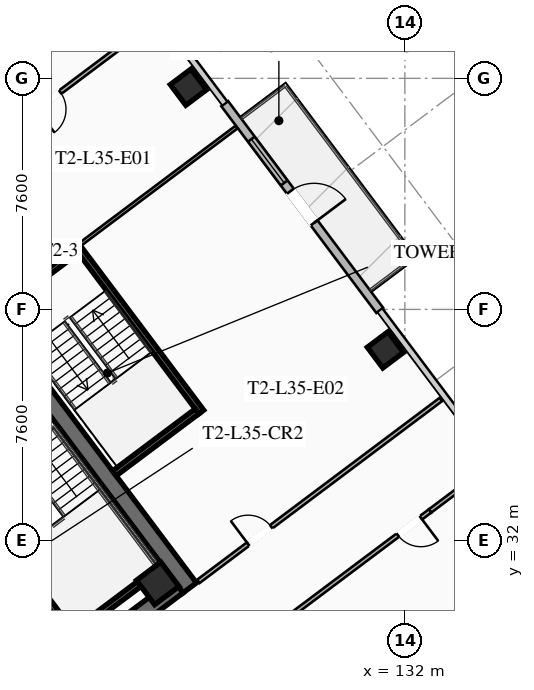
"""IFC4 building model, lengths in metres.
Left out: names, types, materials, properties, quantities, classifications, styles, units other than length and angle.
Written with IfcOpenShell. Run it as: python <this file> out.ifc"""

import sys

from ifc_helpers import new_model, si_unit, direction, frame, frame_2d, origin, origin_2d, place, context, subcontext, project, spatial, rectangle, hollow_rectangle, extrude, element, fill, save


model = new_model("IFC4")
c1 = context("Model", 3, precision=1e-05, world=origin(), true_north=direction((0.0, 1.0)))
c2 = subcontext(c1, "Body", "Model", "MODEL_VIEW")
j1 = project(units=[si_unit("LENGTHUNIT", "METRE"), si_unit("PLANEANGLEUNIT", "RADIAN")], contexts=[c1])
p1 = place(None, origin())
s1 = spatial("IfcSite", under=j1, at=p1, CompositionType="ELEMENT")
p2 = place(p1, origin())
s2 = spatial("IfcBuilding", under=s1, at=p2, CompositionType="ELEMENT")
p3 = place(p2, frame((0.0, 0.0, 132.15)))
s3 = spatial("IfcBuildingStorey", under=s2, at=p3, CompositionType="ELEMENT", Elevation=132.15)
p4 = place(p3, frame((115.564, 42.923, 0.0), z_axis=(0.0, 0.0, 1.0), x_axis=(0.600005007985, -0.799996243986, 0.0)))
e1 = element("IfcWall", 1, at=p4, inside=s3, PredefinedType="SHEAR", context=c2, shape_type="SweptSolid", body=[
    extrude(rectangle(XDim=15.6, YDim=0.55, at=frame_2d((7.8, 0.0))), origin(), (0.0, 0.0, 1.0), 3.55),
])
p5 = place(p3, frame((124.539, 30.498, 0.0), z_axis=(0.0, 0.0, 1.0), x_axis=(-0.799998054672, -0.600002593761, 0.0)))
e2 = element("IfcWall", 2, at=p5, inside=s3, PredefinedType="SHEAR", context=c2, shape_type="SweptSolid", body=[
    extrude(rectangle(XDim=15.06, YDim=0.55, at=frame_2d((7.53, 0.0))), origin(), (0.0, 0.0, 1.0), 3.55),
])
p6 = place(p5, frame((9.23, 0.0, 0.0)))
e3 = element("IfcOpeningElement", 3, at=p6, cuts=e2, PredefinedType="OPENING", context=c2, shape_type="SweptSolid", body=[
    extrude(rectangle(XDim=1.25, YDim=2.25, at=frame_2d((0.625, 1.125))), frame((0.0, 0.285, 0.0), z_axis=(0.0, -1.0, 0.0), x_axis=(1.0, 0.0, 0.0)), (0.0, 0.0, 1.0), 0.57),
])
p7 = place(p5, frame((4.18, 0.0, 0.0)))
e4 = element("IfcOpeningElement", 4, at=p7, cuts=e2, PredefinedType="OPENING", context=c2, shape_type="SweptSolid", body=[
    extrude(rectangle(XDim=1.25, YDim=2.25, at=frame_2d((0.625, 1.125))), frame((0.0, 0.285, 0.0), z_axis=(0.0, -1.0, 0.0), x_axis=(1.0, 0.0, 0.0)), (0.0, 0.0, 1.0), 0.57),
])
p8 = place(p3, frame((123.87, 30.59, 0.0), z_axis=(0.0, 0.0, 1.0), x_axis=(0.799999996291, 0.600000004945, 0.0)))
e5 = element("IfcColumn", 5, at=p8, inside=s3, PredefinedType="COLUMN", context=c2, shape_type="SweptSolid", body=[
    extrude(hollow_rectangle(XDim=1.0, YDim=1.0, WallThickness=0.04, at=origin_2d()), origin(), (0.0, 0.0, 1.0), 3.37),
])
for number, where, z_axis, x_axis in (
    (6, (131.36, 38.27, 0.0), (0.0, 0.0, 1.0), (0.8, 0.6, 0.0)),
    (7, (124.88, 46.91, 0.0), (0.0, 0.0, 1.0), (0.8, 0.6, 0.0)),
):
    element("IfcColumn", number, at=place(p3, frame(where, z_axis=z_axis, x_axis=x_axis)), inside=s3, PredefinedType="COLUMN", context=c2, shape_type="SweptSolid", body=[
        extrude(hollow_rectangle(XDim=0.85, YDim=0.85, WallThickness=0.035, at=origin_2d()), origin(), (0.0, 0.0, 1.0), 3.37),
    ])
p9 = place(p3, frame((126.074, 46.368, 0.0), z_axis=(0.0, 0.0, 1.0), x_axis=(0.600018382406, -0.799986212866, 0.0)))
e8 = element("IfcWall", 8, at=p9, inside=s3, PredefinedType="SOLIDWALL", context=c2, shape_type="SweptSolid", body=[
    extrude(rectangle(XDim=8.5, YDim=0.28, at=frame_2d((4.25, 0.0))), origin(), (0.0, 0.0, 1.0), 3.37),
])
p10 = place(p9, frame((3.6, 0.0, 0.0)))
e9 = element("IfcOpeningElement", 9, at=p10, cuts=e8, PredefinedType="OPENING", context=c2, shape_type="SweptSolid", body=[
    extrude(rectangle(XDim=1.3, YDim=2.15, at=frame_2d((0.65, 1.075))), frame((0.0, 0.15, 0.0), z_axis=(0.0, -1.0, 0.0), x_axis=(1.0, 0.0, 0.0)), (0.0, 0.0, 1.0), 0.3),
])
p11 = place(p9, frame((1.46, 0.0, 0.85)))
e10 = element("IfcOpeningElement", 10, at=p11, cuts=e8, PredefinedType="OPENING", context=c2, shape_type="SweptSolid", body=[
    extrude(rectangle(XDim=1.8, YDim=1.92, at=frame_2d((0.9, 0.96))), frame((0.0, 0.15, 0.0), z_axis=(0.0, -1.0, 0.0), x_axis=(1.0, 0.0, 0.0)), (0.0, 0.0, 1.0), 0.3),
])
p12 = place(p3, frame((116.56, 34.92, 0.0), z_axis=(0.0, 0.0, 1.0), x_axis=(0.59999029481, -0.8000072788, 0.0)))
e11 = element("IfcWall", 11, at=p12, inside=s3, PredefinedType="SHEAR", context=c2, shape_type="SweptSolid", body=[
    extrude(rectangle(XDim=8.05, YDim=0.2, at=frame_2d((4.025, 0.0))), origin(), (0.0, 0.0, 1.0), 3.37),
])
p13 = place(p12, frame((0.45, 0.0, 0.0)))
e12 = element("IfcOpeningElement", 12, at=p13, cuts=e11, PredefinedType="OPENING", context=c2, shape_type="SweptSolid", body=[
    extrude(rectangle(XDim=1.15, YDim=2.2, at=frame_2d((0.575, 1.1))), frame((0.0, 0.11, 0.0), z_axis=(0.0, -1.0, 0.0), x_axis=(1.0, 0.0, 0.0)), (0.0, 0.0, 1.0), 0.22),
])
p14 = place(p3, frame((120.98, 28.86, 0.0), z_axis=(0.0, 0.0, 1.0), x_axis=(0.800015298837, 0.599979601008, 0.0)))
e13 = element("IfcWall", 13, at=p14, inside=s3, PredefinedType="SHEAR", context=c2, shape_type="SweptSolid", body=[
    extrude(rectangle(XDim=3.83, YDim=0.2, at=frame_2d((1.915, 0.0))), origin(), (0.0, 0.0, 1.0), 3.37),
])
p15 = place(p3, frame((125.304, 36.228, 0.0), z_axis=(0.0, 0.0, 1.0), x_axis=(-0.59998851072, 0.800008616831, 0.0)))
e14 = element("IfcWall", 14, at=p15, inside=s3, PredefinedType="SHEAR", context=c2, shape_type="SweptSolid", body=[
    extrude(rectangle(XDim=6.8, YDim=0.2, at=frame_2d((3.4, 0.0))), origin(), (0.0, 0.0, 1.0), 3.37),
])
p16 = place(p3, frame((121.204, 41.528, 0.0), z_axis=(0.0, 0.0, 1.0), x_axis=(-0.800017232136, -0.599977023131, 0.0)))
e15 = element("IfcWall", 15, at=p16, inside=s3, PredefinedType="SHEAR", context=c2, shape_type="SweptSolid", body=[
    extrude(rectangle(XDim=3.4, YDim=0.2, at=frame_2d((1.7, 0.0))), origin(), (0.0, 0.0, 1.0), 3.37),
])
p17 = place(p16, frame((1.975, 0.0, 0.0)))
e16 = element("IfcOpeningElement", 16, at=p17, cuts=e15, PredefinedType="OPENING", context=c2, shape_type="SweptSolid", body=[
    extrude(rectangle(XDim=1.15, YDim=2.2, at=frame_2d((0.575, 1.1))), frame((0.0, 0.11, 0.0), z_axis=(0.0, -1.0, 0.0), x_axis=(1.0, 0.0, 0.0)), (0.0, 0.0, 1.0), 0.22),
])
p18 = place(p3, frame((122.444, 34.208, 0.0), z_axis=(0.0, 0.0, 1.0), x_axis=(0.79999138319, 0.600011488909, 0.0)))
e17 = element("IfcWall", 17, at=p18, inside=s3, PredefinedType="SHEAR", context=c2, shape_type="SweptSolid", body=[
    extrude(rectangle(XDim=3.4, YDim=0.2, at=frame_2d((1.7, 0.0))), origin(), (0.0, 0.0, 1.0), 3.37),
])
p19 = place(p3, frame((95.87, 30.09, 0.0), z_axis=(0.0, 0.0, 1.0), x_axis=(0.799997191971, 0.600003744021, 0.0)))
e18 = element("IfcWall", 18, at=p19, inside=s3, PredefinedType="PARTITIONING", context=c2, shape_type="SweptSolid", body=[
    extrude(rectangle(XDim=31.3, YDim=0.135, at=frame_2d((15.65, 0.0))), origin(), (0.0, 0.0, 1.0), 2.723),
])
p20 = place(p19, frame((0.3, 0.0, 0.0)))
e19 = element("IfcOpeningElement", 19, at=p20, cuts=e18, PredefinedType="OPENING", context=c2, shape_type="SweptSolid", body=[
    extrude(rectangle(XDim=0.95, YDim=2.05, at=frame_2d((0.475, 1.025))), frame((0.0, 0.077, 0.0), z_axis=(0.0, -1.0, 0.0), x_axis=(1.0, 0.0, 0.0)), (0.0, 0.0, 1.0), 0.155),
])
p21 = place(p19, frame((11.202, 0.0, 0.0)))
e20 = element("IfcOpeningElement", 20, at=p21, cuts=e18, PredefinedType="OPENING", context=c2, shape_type="SweptSolid", body=[
    extrude(rectangle(XDim=0.95, YDim=2.05, at=frame_2d((0.475, 1.025))), frame((0.0, 0.077, 0.0), z_axis=(0.0, -1.0, 0.0), x_axis=(1.0, 0.0, 0.0)), (0.0, 0.0, 1.0), 0.155),
])
p22 = place(p19, frame((15.474, 0.0, 0.0)))
e21 = element("IfcOpeningElement", 21, at=p22, cuts=e18, PredefinedType="OPENING", context=c2, shape_type="SweptSolid", body=[
    extrude(rectangle(XDim=0.95, YDim=2.05, at=frame_2d((0.475, 1.025))), frame((0.0, 0.077, 0.0), z_axis=(0.0, -1.0, 0.0), x_axis=(1.0, 0.0, 0.0)), (0.0, 0.0, 1.0), 0.155),
])
p23 = place(p19, frame((30.05, 0.0, 0.0)))
e22 = element("IfcOpeningElement", 22, at=p23, cuts=e18, PredefinedType="OPENING", context=c2, shape_type="SweptSolid", body=[
    extrude(rectangle(XDim=0.95, YDim=2.05, at=frame_2d((0.475, 1.025))), frame((0.0, 0.077, 0.0), z_axis=(0.0, -1.0, 0.0), x_axis=(1.0, 0.0, 0.0)), (0.0, 0.0, 1.0), 0.155),
])
p24 = place(p3, frame((132.832, 32.974, 0.0), z_axis=(0.0, 0.0, 1.0), x_axis=(-0.8, -0.6, 0.0)))
e23 = element("IfcWall", 23, at=p24, inside=s3, PredefinedType="PARTITIONING", context=c2, shape_type="SweptSolid", body=[
    extrude(rectangle(XDim=31.3, YDim=0.135, at=frame_2d((15.65, 0.0))), origin(), (0.0, 0.0, 1.0), 2.723),
])
p25 = place(p24, frame((29.97, 0.0, 0.0)))
e24 = element("IfcOpeningElement", 24, at=p25, cuts=e23, PredefinedType="OPENING", context=c2, shape_type="SweptSolid", body=[
    extrude(rectangle(XDim=0.95, YDim=2.05, at=frame_2d((0.475, 1.025))), frame((0.0, 0.077, 0.0), z_axis=(0.0, -1.0, 0.0), x_axis=(1.0, 0.0, 0.0)), (0.0, 0.0, 1.0), 0.155),
])
p26 = place(p24, frame((15.053, 0.0, 0.0)))
e25 = element("IfcOpeningElement", 25, at=p26, cuts=e23, PredefinedType="OPENING", context=c2, shape_type="SweptSolid", body=[
    extrude(rectangle(XDim=0.95, YDim=2.05, at=frame_2d((0.475, 1.025))), frame((0.0, 0.077, 0.0), z_axis=(0.0, -1.0, 0.0), x_axis=(1.0, 0.0, 0.0)), (0.0, 0.0, 1.0), 0.155),
])
p27 = place(p24, frame((0.38, 0.0, 0.0)))
e26 = element("IfcOpeningElement", 26, at=p27, cuts=e23, PredefinedType="OPENING", context=c2, shape_type="SweptSolid", body=[
    extrude(rectangle(XDim=0.95, YDim=2.05, at=frame_2d((0.475, 1.025))), frame((0.0, 0.077, 0.0), z_axis=(0.0, -1.0, 0.0), x_axis=(1.0, 0.0, 0.0)), (0.0, 0.0, 1.0), 0.155),
])
p28 = place(p3, frame((132.832, 32.974, 0.0), z_axis=(0.0, 0.0, 1.0), x_axis=(0.80002227902, 0.599970293491, 0.0)))
e27 = element("IfcWall", 27, at=p28, inside=s3, PredefinedType="PARTITIONING", context=c2, shape_type="SweptSolid", body=[
    extrude(rectangle(XDim=2.63, YDim=0.135, at=frame_2d((1.315, 0.0))), origin(), (0.0, 0.0, 1.0), 2.723),
])
p29 = place(p3, frame((123.824, 49.118, 0.0), z_axis=(0.0, 0.0, 1.0), x_axis=(-0.799996470201, -0.60000470637, 0.0)))
e28 = element("IfcWall", 28, at=p29, inside=s3, PredefinedType="PARTITIONING", context=c2, shape_type="SweptSolid", body=[
    extrude(rectangle(XDim=8.3, YDim=0.135, at=frame_2d((4.15, 0.0))), origin(), (0.0, 0.0, 1.0), 2.723),
])
p30 = place(p29, frame((3.95, 0.0, 0.0)))
e29 = element("IfcOpeningElement", 29, at=p30, cuts=e28, PredefinedType="OPENING", context=c2, shape_type="SweptSolid", body=[
    extrude(rectangle(XDim=0.95, YDim=2.05, at=frame_2d((0.475, 1.025))), frame((0.0, 0.077, 0.0), z_axis=(0.0, -1.0, 0.0), x_axis=(1.0, 0.0, 0.0)), (0.0, 0.0, 1.0), 0.155),
])
p31 = place(p3, frame((125.208, 30.656, 0.0), z_axis=(0.0, 0.0, 1.0), x_axis=(0.800005876956, 0.599992163979, 0.0)))
e30 = element("IfcWall", 30, at=p31, inside=s3, PredefinedType="PARTITIONING", context=c2, shape_type="SweptSolid", body=[
    extrude(rectangle(XDim=9.97, YDim=0.135, at=frame_2d((4.985, 0.0))), origin(), (0.0, 0.0, 1.0), 2.723),
])
p32 = place(p31, frame((2.045, 0.0, 0.0)))
e31 = element("IfcOpeningElement", 31, at=p32, cuts=e30, PredefinedType="OPENING", context=c2, shape_type="SweptSolid", body=[
    extrude(rectangle(XDim=0.95, YDim=2.05, at=frame_2d((0.475, 1.025))), frame((0.0, 0.077, 0.0), z_axis=(0.0, -1.0, 0.0), x_axis=(1.0, 0.0, 0.0)), (0.0, 0.0, 1.0), 0.155),
])
p33 = place(p3, frame((126.464, 45.598, 0.0), z_axis=(0.0, 0.0, 1.0), x_axis=(-0.8000181681, -0.599975775102, 0.0)))
e32 = element("IfcWall", 32, at=p33, inside=s3, PredefinedType="PARTITIONING", context=c2, shape_type="SweptSolid", body=[
    extrude(rectangle(XDim=6.45, YDim=0.11, at=frame_2d((3.225, 0.0))), origin(), (0.0, 0.0, 1.0), 2.723),
])
p34 = place(p10, origin())
e33 = element("IfcDoor", 33, at=p34, inside=s3, OperationType="SINGLE_SWING_RIGHT", PredefinedType="DOOR", context=c2, shape_type="SweptSolid", body=[
    extrude(rectangle(XDim=1.3, YDim=2.15, at=frame_2d((0.65, 1.075))), frame((0.0, 0.025, 0.0), z_axis=(0.0, -1.0, 0.0), x_axis=(1.0, 0.0, 0.0)), (0.0, 0.0, 1.0), 0.05),
])
fill(e9, e33)
p35 = place(p11, origin())
e34 = element("IfcWindow", 34, at=p35, inside=s3, PartitioningType="SINGLE_PANEL", PredefinedType="WINDOW", context=c2, shape_type="SweptSolid", body=[
    extrude(rectangle(XDim=1.8, YDim=1.92, at=frame_2d((0.9, 0.96))), frame((0.0, 0.03, 0.0), z_axis=(0.0, -1.0, 0.0), x_axis=(1.0, 0.0, 0.0)), (0.0, 0.0, 1.0), 0.06),
])
fill(e10, e34)
p36 = place(p27, origin())
e35 = element("IfcDoor", 35, at=p36, inside=s3, OperationType="SINGLE_SWING_LEFT", PredefinedType="DOOR", context=c2, shape_type="SweptSolid", body=[
    extrude(rectangle(XDim=0.95, YDim=2.05, at=frame_2d((0.475, 1.025))), frame((0.0, 0.025, 0.0), z_axis=(0.0, -1.0, 0.0), x_axis=(1.0, 0.0, 0.0)), (0.0, 0.0, 1.0), 0.05),
])
fill(e26, e35)
p37 = place(p30, origin())
e36 = element("IfcDoor", 36, at=p37, inside=s3, OperationType="SINGLE_SWING_RIGHT", PredefinedType="DOOR", context=c2, shape_type="SweptSolid", body=[
    extrude(rectangle(XDim=0.95, YDim=2.05, at=frame_2d((0.475, 1.025))), frame((0.0, 0.025, 0.0), z_axis=(0.0, -1.0, 0.0), x_axis=(1.0, 0.0, 0.0)), (0.0, 0.0, 1.0), 0.05),
])
fill(e29, e36)
p38 = place(p32, origin())
e37 = element("IfcDoor", 37, at=p38, inside=s3, OperationType="SINGLE_SWING_LEFT", PredefinedType="DOOR", context=c2, shape_type="SweptSolid", body=[
    extrude(rectangle(XDim=0.95, YDim=2.05, at=frame_2d((0.475, 1.025))), frame((0.0, 0.025, 0.0), z_axis=(0.0, -1.0, 0.0), x_axis=(1.0, 0.0, 0.0)), (0.0, 0.0, 1.0), 0.05),
])
fill(e31, e37)
save(model, sys.argv[1])
